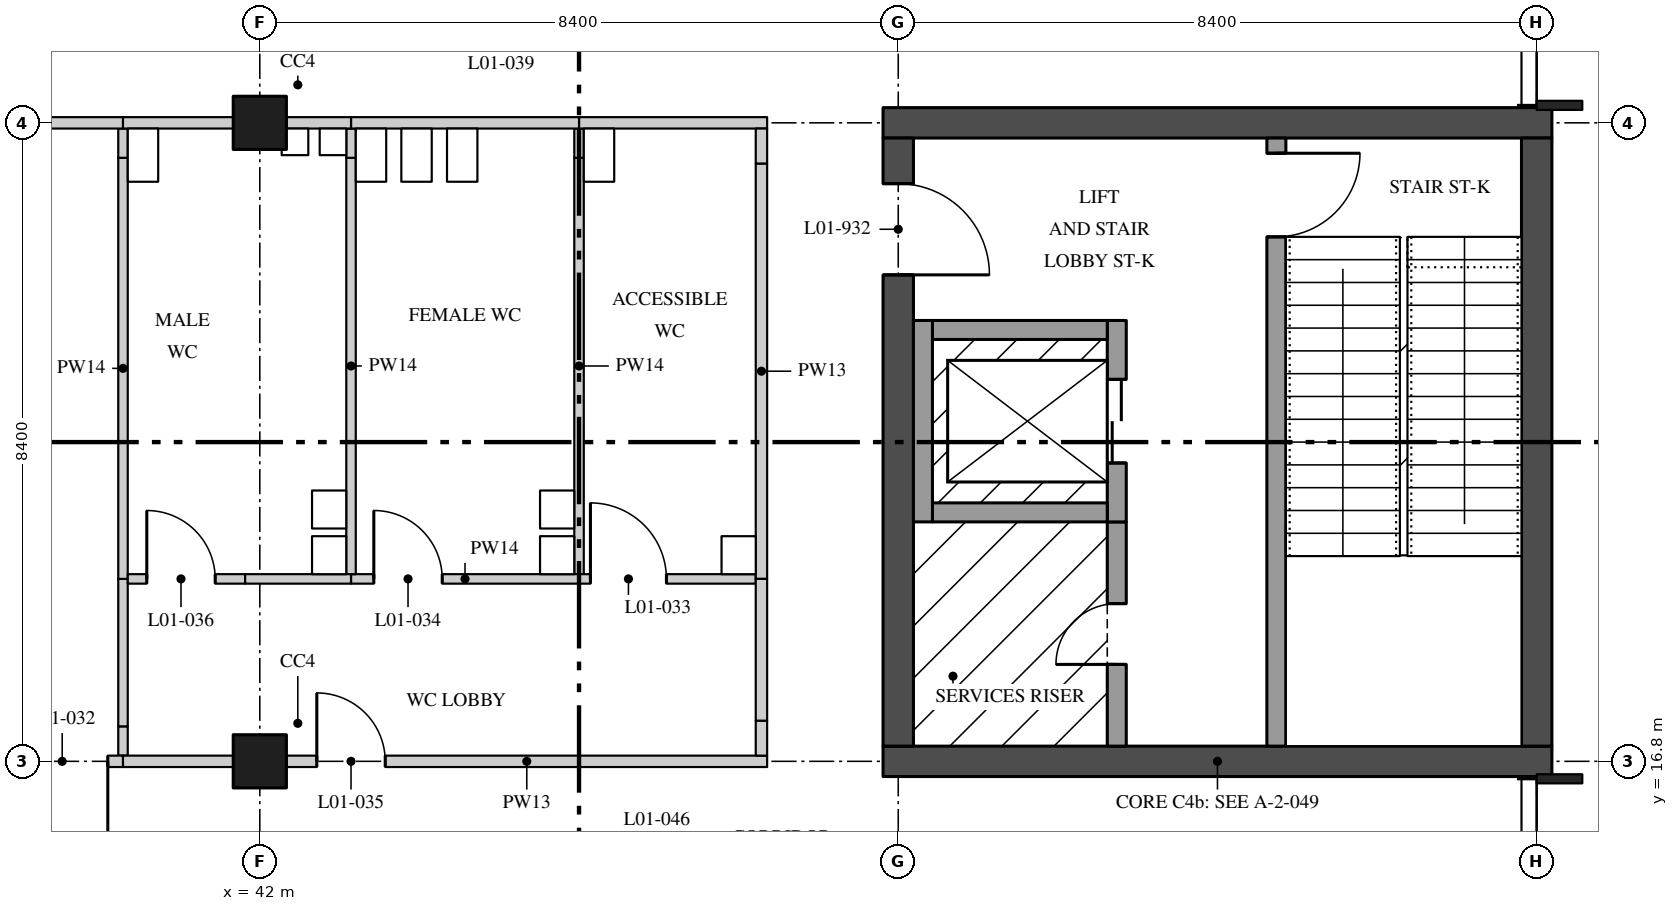
"""IFC4 building model, lengths in metres.
Left out: names, types, materials, properties, quantities, classifications, styles, units other than length and angle.
Written with IfcOpenShell. Run it as: python <this file> out.ifc"""

import sys

from ifc_helpers import new_model, si_unit, direction, frame, frame_2d, origin, origin_2d, place, context, subcontext, project, spatial, rectangle, extrude, element, fill, save


model = new_model("IFC4")
c1 = context("Model", 3, precision=1e-05, world=origin(), true_north=direction((0.0, 1.0)))
c2 = subcontext(c1, "Body", "Model", "MODEL_VIEW")
j1 = project(units=[si_unit("LENGTHUNIT", "METRE"), si_unit("PLANEANGLEUNIT", "RADIAN")], contexts=[c1])
p1 = place(None, origin())
s1 = spatial("IfcSite", under=j1, at=p1, CompositionType="ELEMENT")
p2 = place(p1, origin())
s2 = spatial("IfcBuilding", under=s1, at=p2, CompositionType="ELEMENT")
p3 = place(p2, frame((0.0, 0.0, 5.4)))
s3 = spatial("IfcBuildingStorey", under=s2, at=p3, CompositionType="ELEMENT", Elevation=5.4)
for number, where, z_axis, x_axis in (
    (1, (42.0, 16.8, 0.0), (0.0, 0.0, 1.0), (1.0, 0.0, 0.0)),
    (2, (42.0, 25.2, 0.0), (0.0, 0.0, 1.0), (1.0, 0.0, 0.0)),
):
    element("IfcColumn", number, at=place(p3, frame(where, z_axis=z_axis, x_axis=x_axis)), inside=s3, PredefinedType="COLUMN", context=c2, shape_type="SweptSolid", body=[
        extrude(rectangle(XDim=0.7, YDim=0.7, at=origin_2d()), origin(), (0.0, 0.0, 1.0), 4.37),
    ])
for number, where, z_axis, x_axis in (
    (3, (50.2, 16.8, 0.0), (0.0, 0.0, 1.0), (1.0, 0.0, 0.0)),
    (4, (50.2, 25.2, 0.0), (0.0, 0.0, 1.0), (1.0, 0.0, 0.0)),
):
    element("IfcWall", number, at=place(p3, frame(where, z_axis=z_axis, x_axis=x_axis)), inside=s3, PredefinedType="SHEAR", context=c2, shape_type="SweptSolid", body=[
        extrude(rectangle(XDim=8.8, YDim=0.4, at=frame_2d((4.4, 0.0))), origin(), (0.0, 0.0, 1.0), 4.37),
    ])
p4 = place(p3, frame((50.4, 17.0, 0.0), z_axis=(0.0, 0.0, 1.0), x_axis=(0.0, 1.0, 0.0)))
e5 = element("IfcWall", 5, at=p4, inside=s3, PredefinedType="SHEAR", context=c2, shape_type="SweptSolid", body=[
    extrude(rectangle(XDim=8.0, YDim=0.4, at=frame_2d((4.0, 0.0))), origin(), (0.0, 0.0, 1.0), 4.37),
])
p5 = place(p4, frame((6.2, 0.0, 0.0)))
e6 = element("IfcOpeningElement", 6, at=p5, cuts=e5, PredefinedType="OPENING", context=c2, shape_type="SweptSolid", body=[
    extrude(rectangle(XDim=1.2, YDim=2.1, at=frame_2d((0.6, 1.05))), frame((0.0, 0.21, 0.0), z_axis=(0.0, -1.0, 0.0), x_axis=(1.0, 0.0, 0.0)), (0.0, 0.0, 1.0), 0.42),
])
p6 = place(p3, frame((58.8, 17.0, 0.0), z_axis=(0.0, 0.0, 1.0), x_axis=(0.0, 1.0, 0.0)))
e7 = element("IfcWall", 7, at=p6, inside=s3, PredefinedType="SHEAR", context=c2, shape_type="SweptSolid", body=[
    extrude(rectangle(XDim=8.0, YDim=0.4, at=frame_2d((4.0, 0.0))), origin(), (0.0, 0.0, 1.0), 4.37),
])
p7 = place(p3, frame((55.375, 25.0, 0.0), z_axis=(0.0, 0.0, 1.0), x_axis=(0.0, -1.0, 0.0)))
e8 = element("IfcWall", 8, at=p7, inside=s3, PredefinedType="SOLIDWALL", context=c2, shape_type="SweptSolid", body=[
    extrude(rectangle(XDim=8.0, YDim=0.25, at=frame_2d((4.0, 0.0))), origin(), (0.0, 0.0, 1.0), 4.37),
])
p8 = place(p7, frame((0.2, 0.0, 0.0)))
e9 = element("IfcOpeningElement", 9, at=p8, cuts=e8, PredefinedType="OPENING", context=c2, shape_type="SweptSolid", body=[
    extrude(rectangle(XDim=1.1, YDim=2.1, at=frame_2d((0.55, 1.05))), frame((0.0, 0.135, 0.0), z_axis=(0.0, -1.0, 0.0), x_axis=(1.0, 0.0, 0.0)), (0.0, 0.0, 1.0), 0.27),
])
p9 = place(p3, frame((53.275, 19.95, 0.0), z_axis=(0.0, 0.0, 1.0), x_axis=(0.0, -1.0, 0.0)))
e10 = element("IfcWall", 10, at=p9, inside=s3, PredefinedType="SOLIDWALL", context=c2, shape_type="SweptSolid", body=[
    extrude(rectangle(XDim=2.95, YDim=0.25, at=frame_2d((1.475, 0.0))), origin(), (0.0, 0.0, 1.0), 4.37),
])
p10 = place(p9, frame((1.075, 0.0, 0.0)))
e11 = element("IfcOpeningElement", 11, at=p10, cuts=e10, PredefinedType="OPENING", context=c2, shape_type="SweptSolid", body=[
    extrude(rectangle(XDim=0.8, YDim=2.1, at=frame_2d((0.4, 1.05))), frame((0.0, 0.135, 0.0), z_axis=(0.0, -1.0, 0.0), x_axis=(1.0, 0.0, 0.0)), (0.0, 0.0, 1.0), 0.27),
])
p11 = place(p3, frame((53.275, 19.95, 0.0), z_axis=(0.0, 0.0, 1.0), x_axis=(0.0, 1.0, 0.0)))
e12 = element("IfcWall", 12, at=p11, inside=s3, PredefinedType="SOLIDWALL", context=c2, shape_type="SweptSolid", body=[
    extrude(rectangle(XDim=2.65, YDim=0.25, at=frame_2d((1.325, 0.0))), origin(), (0.0, 0.0, 1.0), 4.37),
])
p12 = place(p11, frame((0.775, 0.0, 0.0)))
e13 = element("IfcOpeningElement", 13, at=p12, cuts=e12, PredefinedType="OPENING", context=c2, shape_type="SweptSolid", body=[
    extrude(rectangle(XDim=1.1, YDim=2.1, at=frame_2d((0.55, 1.05))), frame((0.0, 0.135, 0.0), z_axis=(0.0, -1.0, 0.0), x_axis=(1.0, 0.0, 0.0)), (0.0, 0.0, 1.0), 0.27),
])
for number, where, z_axis, x_axis in (
    (14, (50.85, 22.475, 0.0), (0.0, 0.0, 1.0), (1.0, 0.0, 0.0)),
    (15, (50.85, 20.075, 0.0), (0.0, 0.0, 1.0), (1.0, 0.0, 0.0)),
):
    element("IfcWall", number, at=place(p3, frame(where, z_axis=z_axis, x_axis=x_axis)), inside=s3, PredefinedType="SOLIDWALL", context=c2, shape_type="SweptSolid", body=[
        extrude(rectangle(XDim=2.3, YDim=0.25, at=frame_2d((1.15, 0.0))), origin(), (0.0, 0.0, 1.0), 4.37),
    ])
p13 = place(p3, frame((50.725, 19.95, 0.0), z_axis=(0.0, 0.0, 1.0), x_axis=(0.0, 1.0, 0.0)))
e16 = element("IfcWall", 16, at=p13, inside=s3, PredefinedType="SOLIDWALL", context=c2, shape_type="SweptSolid", body=[
    extrude(rectangle(XDim=2.65, YDim=0.25, at=frame_2d((1.325, 0.0))), origin(), (0.0, 0.0, 1.0), 4.37),
])
p14 = place(p3, frame((40.2, 16.875, 0.0), z_axis=(0.0, 0.0, 1.0), x_axis=(0.0, 1.0, 0.0)))
e17 = element("IfcWall", 17, at=p14, inside=s3, PredefinedType="PARTITIONING", context=c2, shape_type="SweptSolid", body=[
    extrude(rectangle(XDim=0.385, YDim=0.125, at=frame_2d((0.192, 0.0))), origin(), (0.0, 0.0, 1.0), 3.746),
])
p15 = place(p3, frame((40.2, 17.26, 0.0), z_axis=(0.0, 0.0, 1.0), x_axis=(0.0, 1.0, 0.0)))
e18 = element("IfcWall", 18, at=p15, inside=s3, PredefinedType="PARTITIONING", context=c2, shape_type="SweptSolid", body=[
    extrude(rectangle(XDim=1.94, YDim=0.125, at=frame_2d((0.97, 0.0))), origin(), (0.0, 0.0, 1.0), 4.37),
])
p16 = place(p3, frame((40.2, 19.2, 0.0), z_axis=(0.0, 0.0, 1.0), x_axis=(0.0, 1.0, 0.0)))
e19 = element("IfcWall", 19, at=p16, inside=s3, PredefinedType="PARTITIONING", context=c2, shape_type="SweptSolid", body=[
    extrude(rectangle(XDim=5.54, YDim=0.125, at=frame_2d((2.77, 0.0))), origin(), (0.0, 0.0, 1.0), 4.37),
])
p17 = place(p3, frame((40.2, 24.74, 0.0), z_axis=(0.0, 0.0, 1.0), x_axis=(0.0, 1.0, 0.0)))
e20 = element("IfcWall", 20, at=p17, inside=s3, PredefinedType="PARTITIONING", context=c2, shape_type="SweptSolid", body=[
    extrude(rectangle(XDim=0.385, YDim=0.125, at=frame_2d((0.192, 0.0))), origin(), (0.0, 0.0, 1.0), 3.746),
])
p18 = place(p3, frame((33.95, 16.8, 0.0), z_axis=(0.0, 0.0, 1.0), x_axis=(1.0, 0.0, 0.0)))
e21 = element("IfcWall", 21, at=p18, inside=s3, PredefinedType="PARTITIONING", context=c2, shape_type="SweptSolid", body=[
    extrude(rectangle(XDim=6.25, YDim=0.15, at=frame_2d((3.125, 0.0))), origin(), (0.0, 0.0, 1.0), 3.746),
])
p19 = place(p18, frame((0.25, 0.0, 0.0)))
e22 = element("IfcOpeningElement", 22, at=p19, cuts=e21, PredefinedType="OPENING", context=c2, shape_type="SweptSolid", body=[
    extrude(rectangle(XDim=1.2, YDim=2.4, at=frame_2d((0.6, 1.2))), frame((0.0, 0.085, 0.0), z_axis=(0.0, -1.0, 0.0), x_axis=(1.0, 0.0, 0.0)), (0.0, 0.0, 1.0), 0.17),
])
p20 = place(p18, frame((4.85, 0.0, 0.0)))
e23 = element("IfcOpeningElement", 23, at=p20, cuts=e21, PredefinedType="OPENING", context=c2, shape_type="SweptSolid", body=[
    extrude(rectangle(XDim=1.2, YDim=2.4, at=frame_2d((0.6, 1.2))), frame((0.0, 0.085, 0.0), z_axis=(0.0, -1.0, 0.0), x_axis=(1.0, 0.0, 0.0)), (0.0, 0.0, 1.0), 0.17),
])
p21 = place(p3, frame((33.95, 25.2, 0.0), z_axis=(0.0, 0.0, 1.0), x_axis=(1.0, 0.0, 0.0)))
e24 = element("IfcWall", 24, at=p21, inside=s3, PredefinedType="PARTITIONING", context=c2, shape_type="SweptSolid", body=[
    extrude(rectangle(XDim=6.25, YDim=0.15, at=frame_2d((3.125, 0.0))), origin(), (0.0, 0.0, 1.0), 3.746),
])
p22 = place(p3, frame((46.2, 19.262, 0.0), z_axis=(0.0, 0.0, 1.0), x_axis=(0.0, 1.0, 0.0)))
e25 = element("IfcWall", 25, at=p22, inside=s3, PredefinedType="PARTITIONING", context=c2, shape_type="SweptSolid", body=[
    extrude(rectangle(XDim=5.478, YDim=0.125, at=frame_2d((2.739, 0.0))), origin(), (0.0, 0.0, 1.0), 4.37),
])
p23 = place(p3, frame((46.2, 24.74, 0.0), z_axis=(0.0, 0.0, 1.0), x_axis=(0.0, 1.0, 0.0)))
e26 = element("IfcWall", 26, at=p23, inside=s3, PredefinedType="PARTITIONING", context=c2, shape_type="SweptSolid", body=[
    extrude(rectangle(XDim=0.385, YDim=0.125, at=frame_2d((0.192, 0.0))), origin(), (0.0, 0.0, 1.0), 3.746),
])
p24 = place(p3, frame((46.2, 19.2, 0.0), z_axis=(0.0, 0.0, 1.0), x_axis=(1.0, 0.0, 0.0)))
e27 = element("IfcWall", 27, at=p24, inside=s3, PredefinedType="PARTITIONING", context=c2, shape_type="SweptSolid", body=[
    extrude(rectangle(XDim=2.325, YDim=0.125, at=frame_2d((1.163, 0.0))), origin(), (0.0, 0.0, 1.0), 3.895),
])
p25 = place(p24, frame((0.15, 0.0, 0.0)))
e28 = element("IfcOpeningElement", 28, at=p25, cuts=e27, PredefinedType="OPENING", context=c2, shape_type="SweptSolid", body=[
    extrude(rectangle(XDim=1.0, YDim=2.1, at=frame_2d((0.5, 1.05))), frame((0.0, 0.073, 0.0), z_axis=(0.0, -1.0, 0.0), x_axis=(1.0, 0.0, 0.0)), (0.0, 0.0, 1.0), 0.145),
])
p26 = place(p3, frame((46.2, 25.2, 0.0), z_axis=(0.0, 0.0, 1.0), x_axis=(1.0, 0.0, 0.0)))
e29 = element("IfcWall", 29, at=p26, inside=s3, PredefinedType="PARTITIONING", context=c2, shape_type="SweptSolid", body=[
    extrude(rectangle(XDim=2.475, YDim=0.15, at=frame_2d((1.238, 0.0))), origin(), (0.0, 0.0, 1.0), 3.746),
])
p27 = place(p3, frame((48.6, 19.2, 0.0), z_axis=(0.0, 0.0, 1.0), x_axis=(0.0, 1.0, 0.0)))
e30 = element("IfcWall", 30, at=p27, inside=s3, PredefinedType="PARTITIONING", context=c2, shape_type="SweptSolid", body=[
    extrude(rectangle(XDim=5.465, YDim=0.15, at=frame_2d((2.732, 0.0))), origin(), (0.0, 0.0, 1.0), 4.37),
])
p28 = place(p3, frame((48.6, 24.665, 0.0), z_axis=(0.0, 0.0, 1.0), x_axis=(0.0, 1.0, 0.0)))
e31 = element("IfcWall", 31, at=p28, inside=s3, PredefinedType="PARTITIONING", context=c2, shape_type="SweptSolid", body=[
    extrude(rectangle(XDim=0.46, YDim=0.15, at=frame_2d((0.23, 0.0))), origin(), (0.0, 0.0, 1.0), 3.746),
])
p29 = place(p3, frame((43.2, 19.2, 0.0), z_axis=(0.0, 0.0, 1.0), x_axis=(1.0, 0.0, 0.0)))
e32 = element("IfcWall", 32, at=p29, inside=s3, PredefinedType="PARTITIONING", context=c2, shape_type="SweptSolid", body=[
    extrude(rectangle(XDim=3.0, YDim=0.125, at=frame_2d((1.5, 0.0))), origin(), (0.0, 0.0, 1.0), 3.895),
])
p30 = place(p29, frame((0.3, 0.0, 0.0)))
e33 = element("IfcOpeningElement", 33, at=p30, cuts=e32, PredefinedType="OPENING", context=c2, shape_type="SweptSolid", body=[
    extrude(rectangle(XDim=0.9, YDim=2.1, at=frame_2d((0.45, 1.05))), frame((0.0, 0.073, 0.0), z_axis=(0.0, -1.0, 0.0), x_axis=(1.0, 0.0, 0.0)), (0.0, 0.0, 1.0), 0.145),
])
p31 = place(p3, frame((43.2, 19.262, 0.0), z_axis=(0.0, 0.0, 1.0), x_axis=(0.0, 1.0, 0.0)))
e34 = element("IfcWall", 34, at=p31, inside=s3, PredefinedType="PARTITIONING", context=c2, shape_type="SweptSolid", body=[
    extrude(rectangle(XDim=5.478, YDim=0.125, at=frame_2d((2.739, 0.0))), origin(), (0.0, 0.0, 1.0), 4.37),
])
p32 = place(p3, frame((43.2, 24.74, 0.0), z_axis=(0.0, 0.0, 1.0), x_axis=(0.0, 1.0, 0.0)))
e35 = element("IfcWall", 35, at=p32, inside=s3, PredefinedType="PARTITIONING", context=c2, shape_type="SweptSolid", body=[
    extrude(rectangle(XDim=0.385, YDim=0.125, at=frame_2d((0.192, 0.0))), origin(), (0.0, 0.0, 1.0), 3.746),
])
p33 = place(p3, frame((43.2, 25.2, 0.0), z_axis=(0.0, 0.0, 1.0), x_axis=(1.0, 0.0, 0.0)))
e36 = element("IfcWall", 36, at=p33, inside=s3, PredefinedType="PARTITIONING", context=c2, shape_type="SweptSolid", body=[
    extrude(rectangle(XDim=3.0, YDim=0.15, at=frame_2d((1.5, 0.0))), origin(), (0.0, 0.0, 1.0), 3.746),
])
p34 = place(p3, frame((40.263, 19.2, 0.0), z_axis=(0.0, 0.0, 1.0), x_axis=(1.0, 0.0, 0.0)))
e37 = element("IfcWall", 37, at=p34, inside=s3, PredefinedType="PARTITIONING", context=c2, shape_type="SweptSolid", body=[
    extrude(rectangle(XDim=1.544, YDim=0.125, at=frame_2d((0.772, 0.0))), origin(), (0.0, 0.0, 1.0), 4.37),
])
p35 = place(p34, frame((0.25, 0.0, 0.0)))
e38 = element("IfcOpeningElement", 38, at=p35, cuts=e37, PredefinedType="OPENING", context=c2, shape_type="SweptSolid", body=[
    extrude(rectangle(XDim=0.9, YDim=2.1, at=frame_2d((0.45, 1.05))), frame((0.0, 0.073, 0.0), z_axis=(0.0, -1.0, 0.0), x_axis=(1.0, 0.0, 0.0)), (0.0, 0.0, 1.0), 0.145),
])
p36 = place(p3, frame((41.807, 19.2, 0.0), z_axis=(0.0, 0.0, 1.0), x_axis=(1.0, 0.0, 0.0)))
e39 = element("IfcWall", 39, at=p36, inside=s3, PredefinedType="PARTITIONING", context=c2, shape_type="SweptSolid", body=[
    extrude(rectangle(XDim=1.393, YDim=0.125, at=frame_2d((0.697, 0.0))), origin(), (0.0, 0.0, 1.0), 3.746),
])
p37 = place(p3, frame((40.2, 16.8, 0.0), z_axis=(0.0, 0.0, 1.0), x_axis=(1.0, 0.0, 0.0)))
e40 = element("IfcWall", 40, at=p37, inside=s3, PredefinedType="PARTITIONING", context=c2, shape_type="SweptSolid", body=[
    extrude(rectangle(XDim=1.45, YDim=0.15, at=frame_2d((0.725, 0.0))), origin(), (0.0, 0.0, 1.0), 3.746),
])
p38 = place(p3, frame((42.35, 16.8, 0.0), z_axis=(0.0, 0.0, 1.0), x_axis=(1.0, 0.0, 0.0)))
e41 = element("IfcWall", 41, at=p38, inside=s3, PredefinedType="PARTITIONING", context=c2, shape_type="SweptSolid", body=[
    extrude(rectangle(XDim=6.325, YDim=0.15, at=frame_2d((3.163, 0.0))), origin(), (0.0, 0.0, 1.0), 3.746),
])
p39 = place(p38, frame((0.4, 0.0, 0.0)))
e42 = element("IfcOpeningElement", 42, at=p39, cuts=e41, PredefinedType="OPENING", context=c2, shape_type="SweptSolid", body=[
    extrude(rectangle(XDim=0.9, YDim=2.1, at=frame_2d((0.45, 1.05))), frame((0.0, 0.085, 0.0), z_axis=(0.0, -1.0, 0.0), x_axis=(1.0, 0.0, 0.0)), (0.0, 0.0, 1.0), 0.17),
])
p40 = place(p3, frame((48.6, 16.875, 0.0), z_axis=(0.0, 0.0, 1.0), x_axis=(0.0, 1.0, 0.0)))
e43 = element("IfcWall", 43, at=p40, inside=s3, PredefinedType="PARTITIONING", context=c2, shape_type="SweptSolid", body=[
    extrude(rectangle(XDim=0.46, YDim=0.15, at=frame_2d((0.23, 0.0))), origin(), (0.0, 0.0, 1.0), 3.746),
])
p41 = place(p3, frame((48.6, 17.335, 0.0), z_axis=(0.0, 0.0, 1.0), x_axis=(0.0, 1.0, 0.0)))
e44 = element("IfcWall", 44, at=p41, inside=s3, PredefinedType="PARTITIONING", context=c2, shape_type="SweptSolid", body=[
    extrude(rectangle(XDim=1.865, YDim=0.15, at=frame_2d((0.933, 0.0))), origin(), (0.0, 0.0, 1.0), 4.37),
])
p42 = place(p3, frame((40.2, 25.2, 0.0), z_axis=(0.0, 0.0, 1.0), x_axis=(1.0, 0.0, 0.0)))
e45 = element("IfcWall", 45, at=p42, inside=s3, PredefinedType="PARTITIONING", context=c2, shape_type="SweptSolid", body=[
    extrude(rectangle(XDim=1.45, YDim=0.15, at=frame_2d((0.725, 0.0))), origin(), (0.0, 0.0, 1.0), 3.746),
])
p43 = place(p3, frame((42.35, 25.2, 0.0), z_axis=(0.0, 0.0, 1.0), x_axis=(1.0, 0.0, 0.0)))
e46 = element("IfcWall", 46, at=p43, inside=s3, PredefinedType="PARTITIONING", context=c2, shape_type="SweptSolid", body=[
    extrude(rectangle(XDim=0.85, YDim=0.15, at=frame_2d((0.425, 0.0))), origin(), (0.0, 0.0, 1.0), 3.746),
])
p44 = place(p5, frame((1.2, 0.0, 0.0), z_axis=(0.0, 0.0, 1.0), x_axis=(-1.0, 0.0, 0.0)))
e47 = element("IfcDoor", 47, at=p44, inside=s3, OperationType="SINGLE_SWING_LEFT", PredefinedType="DOOR", context=c2, shape_type="SweptSolid", body=[
    extrude(rectangle(XDim=1.2, YDim=2.1, at=frame_2d((0.6, 1.05))), frame((0.0, 0.035, 0.0), z_axis=(0.0, -1.0, 0.0), x_axis=(1.0, 0.0, 0.0)), (0.0, 0.0, 1.0), 0.07),
])
fill(e6, e47)
p45 = place(p10, frame((0.8, 0.0, 0.0), z_axis=(0.0, 0.0, 1.0), x_axis=(-1.0, 0.0, 0.0)))
e48 = element("IfcDoor", 48, at=p45, inside=s3, OperationType="SINGLE_SWING_RIGHT", PredefinedType="DOOR", context=c2, shape_type="SweptSolid", body=[
    extrude(rectangle(XDim=0.8, YDim=2.1, at=frame_2d((0.4, 1.05))), frame((0.0, 0.035, 0.0), z_axis=(0.0, -1.0, 0.0), x_axis=(1.0, 0.0, 0.0)), (0.0, 0.0, 1.0), 0.07),
])
fill(e11, e48)
p46 = place(p8, origin())
e49 = element("IfcDoor", 49, at=p46, inside=s3, OperationType="SINGLE_SWING_RIGHT", PredefinedType="DOOR", context=c2, shape_type="SweptSolid", body=[
    extrude(rectangle(XDim=1.1, YDim=2.1, at=frame_2d((0.55, 1.05))), frame((0.0, 0.035, 0.0), z_axis=(0.0, -1.0, 0.0), x_axis=(1.0, 0.0, 0.0)), (0.0, 0.0, 1.0), 0.07),
])
fill(e9, e49)
p47 = place(p12, origin())
e50 = element("IfcDoor", 50, at=p47, inside=s3, OperationType="DOUBLE_DOOR_SLIDING", PredefinedType="DOOR", context=c2, shape_type="SweptSolid", body=[
    extrude(rectangle(XDim=1.1, YDim=2.1, at=frame_2d((0.55, 1.05))), frame((0.0, 0.04, 0.0), z_axis=(0.0, -1.0, 0.0), x_axis=(1.0, 0.0, 0.0)), (0.0, 0.0, 1.0), 0.08),
])
fill(e13, e50)
p48 = place(p20, frame((1.2, 0.0, 0.0), z_axis=(0.0, 0.0, 1.0), x_axis=(-1.0, 0.0, 0.0)))
e51 = element("IfcDoor", 51, at=p48, inside=s3, OperationType="SINGLE_SWING_RIGHT", PredefinedType="DOOR", context=c2, shape_type="SweptSolid", body=[
    extrude(rectangle(XDim=1.2, YDim=2.4, at=frame_2d((0.6, 1.2))), frame((0.0, 0.025, 0.0), z_axis=(0.0, -1.0, 0.0), x_axis=(1.0, 0.0, 0.0)), (0.0, 0.0, 1.0), 0.05),
])
fill(e23, e51)
p49 = place(p25, origin())
e52 = element("IfcDoor", 52, at=p49, inside=s3, OperationType="SINGLE_SWING_RIGHT", PredefinedType="DOOR", context=c2, shape_type="SweptSolid", body=[
    extrude(rectangle(XDim=1.0, YDim=2.1, at=frame_2d((0.5, 1.05))), frame((0.0, 0.02, 0.0), z_axis=(0.0, -1.0, 0.0), x_axis=(1.0, 0.0, 0.0)), (0.0, 0.0, 1.0), 0.04),
])
fill(e28, e52)
p50 = place(p30, origin())
e53 = element("IfcDoor", 53, at=p50, inside=s3, OperationType="SINGLE_SWING_RIGHT", PredefinedType="DOOR", context=c2, shape_type="SweptSolid", body=[
    extrude(rectangle(XDim=0.9, YDim=2.1, at=frame_2d((0.45, 1.05))), frame((0.0, 0.02, 0.0), z_axis=(0.0, -1.0, 0.0), x_axis=(1.0, 0.0, 0.0)), (0.0, 0.0, 1.0), 0.04),
])
fill(e33, e53)
p51 = place(p39, origin())
e54 = element("IfcDoor", 54, at=p51, inside=s3, OperationType="SINGLE_SWING_RIGHT", PredefinedType="DOOR", context=c2, shape_type="SweptSolid", body=[
    extrude(rectangle(XDim=0.9, YDim=2.1, at=frame_2d((0.45, 1.05))), frame((0.0, 0.025, 0.0), z_axis=(0.0, -1.0, 0.0), x_axis=(1.0, 0.0, 0.0)), (0.0, 0.0, 1.0), 0.05),
])
fill(e42, e54)
p52 = place(p35, origin())
e55 = element("IfcDoor", 55, at=p52, inside=s3, OperationType="SINGLE_SWING_RIGHT", PredefinedType="DOOR", context=c2, shape_type="SweptSolid", body=[
    extrude(rectangle(XDim=0.9, YDim=2.1, at=frame_2d((0.45, 1.05))), frame((0.0, 0.02, 0.0), z_axis=(0.0, -1.0, 0.0), x_axis=(1.0, 0.0, 0.0)), (0.0, 0.0, 1.0), 0.04),
])
fill(e38, e55)
save(model, sys.argv[1])
